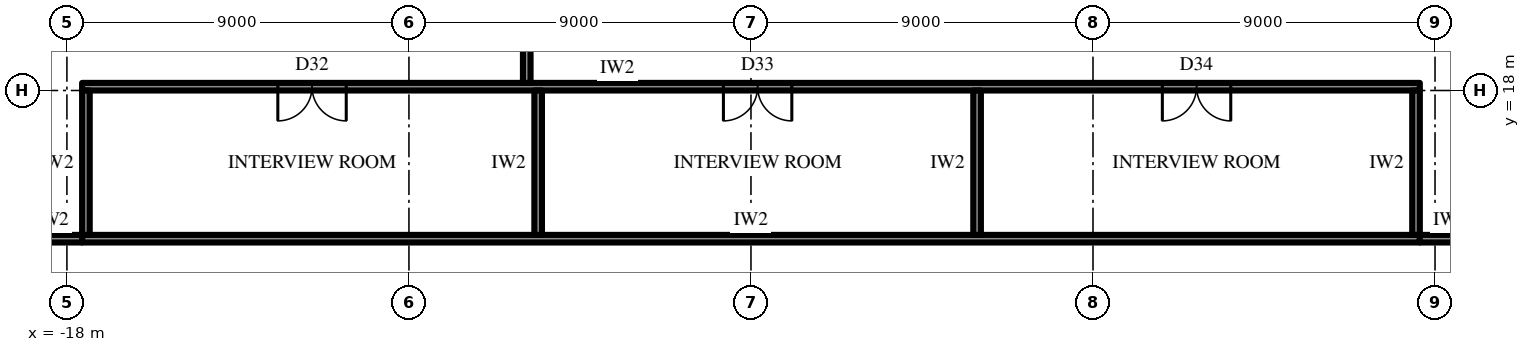
"""IFC4 building model, lengths in metres.
Left out: names, types, materials, properties, quantities, classifications, styles, units other than length and angle.
Written with IfcOpenShell. Run it as: python <this file> out.ifc"""

import sys

from ifc_helpers import new_model, si_unit, direction, frame, frame_2d, origin, place, context, subcontext, project, spatial, rectangle, extrude, element, fill, save


model = new_model("IFC4")
c1 = context("Model", 3, precision=1e-05, world=origin(), true_north=direction((0.0, 1.0)))
c2 = subcontext(c1, "Body", "Model", "MODEL_VIEW")
j1 = project(units=[si_unit("LENGTHUNIT", "METRE"), si_unit("PLANEANGLEUNIT", "RADIAN")], contexts=[c1])
p1 = place(None, origin())
s1 = spatial("IfcSite", under=j1, at=p1, CompositionType="ELEMENT")
p2 = place(p1, origin())
s2 = spatial("IfcBuilding", under=s1, at=p2, CompositionType="ELEMENT")
p3 = place(p2, frame((0.0, 0.0, 86.5)))
s3 = spatial("IfcBuildingStorey", under=s2, at=p3, CompositionType="ELEMENT", Elevation=86.5)
p4 = place(p3, frame((-17.6, 14.1, 0.0), z_axis=(0.0, 0.0, 1.0), x_axis=(1.0, 0.0, 0.0)))
e1 = element("IfcWall", 1, at=p4, inside=s3, PredefinedType="PARTITIONING", context=c2, shape_type="SweptSolid", body=[
    extrude(rectangle(XDim=35.2, YDim=0.2, at=frame_2d((17.6, 0.0))), origin(), (0.0, 0.0, 1.0), 4.0),
])
p5 = place(p3, frame((-17.6, 18.1, 0.0), z_axis=(0.0, 0.0, 1.0), x_axis=(1.0, 0.0, 0.0)))
e2 = element("IfcWall", 2, at=p5, inside=s3, PredefinedType="PARTITIONING", context=c2, shape_type="SweptSolid", body=[
    extrude(rectangle(XDim=35.2, YDim=0.2, at=frame_2d((17.6, 0.0))), origin(), (0.0, 0.0, 1.0), 4.0),
])
p6 = place(p5, frame((5.15, 0.0, 0.0)))
e3 = element("IfcOpeningElement", 3, at=p6, cuts=e2, PredefinedType="OPENING", context=c2, shape_type="SweptSolid", body=[
    extrude(rectangle(XDim=1.8, YDim=2.4, at=frame_2d((0.9, 1.2))), frame((0.0, 0.11, 0.0), z_axis=(0.0, -1.0, 0.0), x_axis=(1.0, 0.0, 0.0)), (0.0, 0.0, 1.0), 0.22),
])
p7 = place(p5, frame((16.875, 0.0, 0.0)))
e4 = element("IfcOpeningElement", 4, at=p7, cuts=e2, PredefinedType="OPENING", context=c2, shape_type="SweptSolid", body=[
    extrude(rectangle(XDim=1.8, YDim=2.4, at=frame_2d((0.9, 1.2))), frame((0.0, 0.11, 0.0), z_axis=(0.0, -1.0, 0.0), x_axis=(1.0, 0.0, 0.0)), (0.0, 0.0, 1.0), 0.22),
])
p8 = place(p5, frame((28.425, 0.0, 0.0)))
e5 = element("IfcOpeningElement", 5, at=p8, cuts=e2, PredefinedType="OPENING", context=c2, shape_type="SweptSolid", body=[
    extrude(rectangle(XDim=1.8, YDim=2.4, at=frame_2d((0.9, 1.2))), frame((0.0, 0.11, 0.0), z_axis=(0.0, -1.0, 0.0), x_axis=(1.0, 0.0, 0.0)), (0.0, 0.0, 1.0), 0.22),
])
for number, where, z_axis, x_axis in (
    (6, (-17.5, 14.2, 0.0), (0.0, 0.0, 1.0), (0.0, 1.0, 0.0)),
    (7, (-5.6, 14.2, 0.0), (0.0, 0.0, 1.0), (0.0, 1.0, 0.0)),
    (8, (5.95, 14.2, 0.0), (0.0, 0.0, 1.0), (0.0, 1.0, 0.0)),
    (9, (17.5, 14.2, 0.0), (0.0, 0.0, 1.0), (0.0, 1.0, 0.0)),
):
    element("IfcWall", number, at=place(p3, frame(where, z_axis=z_axis, x_axis=x_axis)), inside=s3, PredefinedType="PARTITIONING", context=c2, shape_type="SweptSolid", body=[
        extrude(rectangle(XDim=3.8, YDim=0.2, at=frame_2d((1.9, 0.0))), origin(), (0.0, 0.0, 1.0), 4.0),
    ])
for number, where, z_axis, x_axis in (
    (10, (-19.2, 14.1, 0.0), (0.0, 0.0, 1.0), (1.0, 0.0, 0.0)),
    (11, (17.6, 14.1, 0.0), (0.0, 0.0, 1.0), (1.0, 0.0, 0.0)),
):
    element("IfcWall", number, at=place(p3, frame(where, z_axis=z_axis, x_axis=x_axis)), inside=s3, PredefinedType="PARTITIONING", context=c2, shape_type="SweptSolid", body=[
        extrude(rectangle(XDim=1.6, YDim=0.2, at=frame_2d((0.8, 0.0))), origin(), (0.0, 0.0, 1.0), 4.0),
    ])
p9 = place(p3, frame((-5.9, 18.2, 0.0), z_axis=(0.0, 0.0, 1.0), x_axis=(0.0, 1.0, 0.0)))
e12 = element("IfcWall", 12, at=p9, inside=s3, PredefinedType="PARTITIONING", context=c2, shape_type="SweptSolid", body=[
    extrude(rectangle(XDim=14.1, YDim=0.2, at=frame_2d((7.05, 0.0))), origin(), (0.0, 0.0, 1.0), 4.0),
])
p10 = place(p9, frame((0.91, 0.0, 0.0)))
e13 = element("IfcOpeningElement", 13, at=p10, cuts=e12, PredefinedType="OPENING", context=c2, shape_type="SweptSolid", body=[
    extrude(rectangle(XDim=1.0, YDim=2.2, at=frame_2d((0.5, 1.1))), frame((0.0, 0.11, 0.0), z_axis=(0.0, -1.0, 0.0), x_axis=(1.0, 0.0, 0.0)), (0.0, 0.0, 1.0), 0.22),
])
p11 = place(p6, frame((1.8, 0.0, 0.0), z_axis=(0.0, 0.0, 1.0), x_axis=(-1.0, 0.0, 0.0)))
e14 = element("IfcDoor", 14, at=p11, inside=s3, OperationType="DOUBLE_DOOR_SINGLE_SWING", PredefinedType="DOOR", context=c2, shape_type="SweptSolid", body=[
    extrude(rectangle(XDim=1.8, YDim=2.4, at=frame_2d((0.9, 1.2))), frame((0.0, 0.025, 0.0), z_axis=(0.0, -1.0, 0.0), x_axis=(1.0, 0.0, 0.0)), (0.0, 0.0, 1.0), 0.05),
])
fill(e3, e14)
p12 = place(p7, frame((1.8, 0.0, 0.0), z_axis=(0.0, 0.0, 1.0), x_axis=(-1.0, 0.0, 0.0)))
e15 = element("IfcDoor", 15, at=p12, inside=s3, OperationType="DOUBLE_DOOR_SINGLE_SWING", PredefinedType="DOOR", context=c2, shape_type="SweptSolid", body=[
    extrude(rectangle(XDim=1.8, YDim=2.4, at=frame_2d((0.9, 1.2))), frame((0.0, 0.025, 0.0), z_axis=(0.0, -1.0, 0.0), x_axis=(1.0, 0.0, 0.0)), (0.0, 0.0, 1.0), 0.05),
])
fill(e4, e15)
p13 = place(p8, frame((1.8, 0.0, 0.0), z_axis=(0.0, 0.0, 1.0), x_axis=(-1.0, 0.0, 0.0)))
e16 = element("IfcDoor", 16, at=p13, inside=s3, OperationType="DOUBLE_DOOR_SINGLE_SWING", PredefinedType="DOOR", context=c2, shape_type="SweptSolid", body=[
    extrude(rectangle(XDim=1.8, YDim=2.4, at=frame_2d((0.9, 1.2))), frame((0.0, 0.025, 0.0), z_axis=(0.0, -1.0, 0.0), x_axis=(1.0, 0.0, 0.0)), (0.0, 0.0, 1.0), 0.05),
])
fill(e5, e16)
save(model, sys.argv[1])
